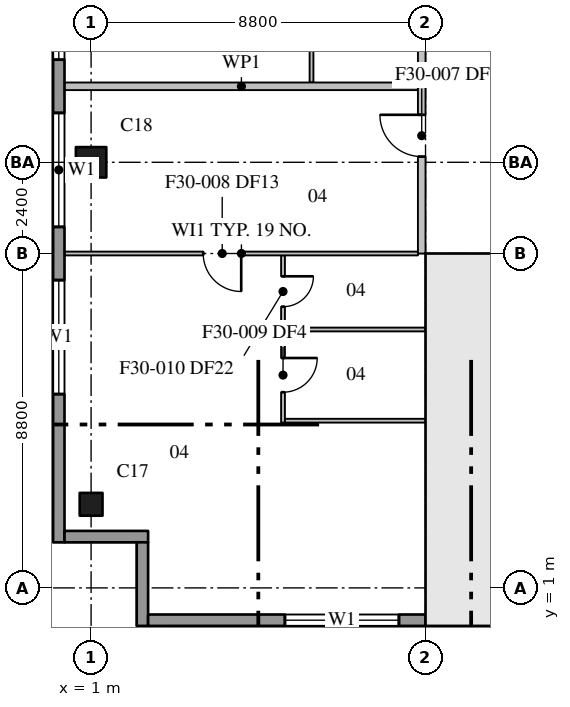
"""IFC4 building model, lengths in metres.
Left out: names, types, materials, properties, quantities, classifications, styles, units other than length and angle.
Written with IfcOpenShell. Run it as: python <this file> out.ifc"""

import sys

from ifc_helpers import new_model, si_unit, direction, frame, frame_2d, origin, origin_2d, place, context, subcontext, project, spatial, rectangle, extrude, element, fill, save


model = new_model("IFC4")
c1 = context("Model", 3, precision=1e-05, world=origin(), true_north=direction((0.0, 1.0)))
c2 = subcontext(c1, "Body", "Model", "MODEL_VIEW")
j1 = project(units=[si_unit("LENGTHUNIT", "METRE"), si_unit("PLANEANGLEUNIT", "RADIAN")], contexts=[c1])
p1 = place(None, origin())
s1 = spatial("IfcSite", under=j1, at=p1, CompositionType="ELEMENT")
p2 = place(p1, origin())
s2 = spatial("IfcBuilding", under=s1, at=p2, CompositionType="ELEMENT")
p3 = place(p2, frame((0.0, 0.0, 241.3)))
s3 = spatial("IfcBuildingStorey", under=s2, at=p3, CompositionType="ELEMENT", Elevation=241.3)
p4 = place(p3, frame((1.0, 3.2, 0.0), z_axis=(0.0, 0.0, 1.0), x_axis=(1.0, 0.0, 0.0)))
e1 = element("IfcColumn", 1, at=p4, inside=s3, PredefinedType="COLUMN", context=c2, shape_type="SweptSolid", body=[
    extrude(rectangle(XDim=0.6, YDim=0.6, at=origin_2d()), origin(), (0.0, 0.0, 1.0), 3.7),
])
p5 = place(p3, frame((1.0, 12.2, 0.0), z_axis=(0.0, 0.0, 1.0), x_axis=(1.0, 0.0, 0.0)))
e2 = element("IfcColumn", 2, at=p5, inside=s3, PredefinedType="COLUMN", context=c2, shape_type="SweptSolid", body=[
    extrude(rectangle(XDim=0.8, YDim=0.8, at=origin_2d()), origin(), (0.0, 0.0, 1.0), 3.7),
])
p6 = place(p3, frame((9.8, 0.95, 0.0), z_axis=(0.0, 0.0, 1.0), x_axis=(1.0, 0.0, 0.0)))
e3 = element("IfcWall", 3, at=p6, inside=s3, PredefinedType="SHEAR", context=c2, shape_type="SweptSolid", body=[
    extrude(rectangle(XDim=35.2, YDim=0.5, at=frame_2d((17.6, 0.0))), origin(), (0.0, 0.0, 1.0), 3.7),
])
p7 = place(p3, frame((10.75, 1.2, 0.0), z_axis=(0.0, 0.0, 1.0), x_axis=(0.0, 1.0, 0.0)))
e4 = element("IfcWall", 4, at=p7, inside=s3, PredefinedType="SHEAR", context=c2, shape_type="SweptSolid", body=[
    extrude(rectangle(XDim=8.6, YDim=0.5, at=frame_2d((4.3, 0.0))), origin(), (0.0, 0.0, 1.0), 3.7),
])
p8 = place(p3, frame((9.8, 9.6, 0.0), z_axis=(0.0, 0.0, 1.0), x_axis=(1.0, 0.0, 0.0)))
e5 = element("IfcWall", 5, at=p8, inside=s3, PredefinedType="SHEAR", context=c2, shape_type="SweptSolid", body=[
    extrude(rectangle(XDim=4.3, YDim=0.4, at=frame_2d((2.15, 0.0))), origin(), (0.0, 0.0, 1.0), 3.7),
])
p9 = place(p8, frame((2.05, 0.0, 0.0)))
e6 = element("IfcOpeningElement", 6, at=p9, cuts=e5, PredefinedType="OPENING", context=c2, shape_type="SweptSolid", body=[
    extrude(rectangle(XDim=1.2, YDim=2.1, at=frame_2d((0.6, 1.05))), frame((0.0, 0.21, 0.0), z_axis=(0.0, -1.0, 0.0), x_axis=(1.0, 0.0, 0.0)), (0.0, 0.0, 1.0), 0.42),
])
p10 = place(p3, frame((0.15, 31.65, 0.0), z_axis=(0.0, 0.0, 1.0), x_axis=(0.0, -1.0, 0.0)))
e7 = element("IfcWall", 7, at=p10, inside=s3, PredefinedType="STANDARD", context=c2, shape_type="SweptSolid", body=[
    extrude(rectangle(XDim=29.45, YDim=0.3, at=frame_2d((14.725, 0.0))), origin(), (0.0, 0.0, 1.0), 3.4),
])
p11 = place(p10, frame((4.95, 0.0, 0.75)))
e8 = element("IfcOpeningElement", 8, at=p11, cuts=e7, PredefinedType="OPENING", context=c2, shape_type="SweptSolid", body=[
    extrude(rectangle(XDim=3.0, YDim=2.3, at=frame_2d((1.5, 1.15))), frame((0.0, 0.16, 0.0), z_axis=(0.0, -1.0, 0.0), x_axis=(1.0, 0.0, 0.0)), (0.0, 0.0, 1.0), 0.32),
])
p12 = place(p10, frame((9.35, 0.0, 0.75)))
e9 = element("IfcOpeningElement", 9, at=p12, cuts=e7, PredefinedType="OPENING", context=c2, shape_type="SweptSolid", body=[
    extrude(rectangle(XDim=3.0, YDim=2.3, at=frame_2d((1.5, 1.15))), frame((0.0, 0.16, 0.0), z_axis=(0.0, -1.0, 0.0), x_axis=(1.0, 0.0, 0.0)), (0.0, 0.0, 1.0), 0.32),
])
p13 = place(p10, frame((13.75, 0.0, 0.75)))
e10 = element("IfcOpeningElement", 10, at=p13, cuts=e7, PredefinedType="OPENING", context=c2, shape_type="SweptSolid", body=[
    extrude(rectangle(XDim=3.0, YDim=2.3, at=frame_2d((1.5, 1.15))), frame((0.0, 0.16, 0.0), z_axis=(0.0, -1.0, 0.0), x_axis=(1.0, 0.0, 0.0)), (0.0, 0.0, 1.0), 0.32),
])
p14 = place(p10, frame((18.15, 0.0, 0.75)))
e11 = element("IfcOpeningElement", 11, at=p14, cuts=e7, PredefinedType="OPENING", context=c2, shape_type="SweptSolid", body=[
    extrude(rectangle(XDim=3.0, YDim=2.3, at=frame_2d((1.5, 1.15))), frame((0.0, 0.16, 0.0), z_axis=(0.0, -1.0, 0.0), x_axis=(1.0, 0.0, 0.0)), (0.0, 0.0, 1.0), 0.32),
])
p15 = place(p10, frame((22.55, 0.0, 0.75)))
e12 = element("IfcOpeningElement", 12, at=p15, cuts=e7, PredefinedType="OPENING", context=c2, shape_type="SweptSolid", body=[
    extrude(rectangle(XDim=3.0, YDim=2.3, at=frame_2d((1.5, 1.15))), frame((0.0, 0.16, 0.0), z_axis=(0.0, -1.0, 0.0), x_axis=(1.0, 0.0, 0.0)), (0.0, 0.0, 1.0), 0.32),
])
for number, where, z_axis, x_axis in (
    (13, (0.3, 2.35, 0.0), (0.0, 0.0, 1.0), (1.0, 0.0, 0.0)),
    (14, (2.35, 2.2, 0.0), (0.0, 0.0, 1.0), (0.0, -1.0, 0.0)),
):
    element("IfcWall", number, at=place(p3, frame(where, z_axis=z_axis, x_axis=x_axis)), inside=s3, PredefinedType="STANDARD", context=c2, shape_type="SweptSolid", body=[
        extrude(rectangle(XDim=2.2, YDim=0.3, at=frame_2d((1.1, 0.0))), origin(), (0.0, 0.0, 1.0), 3.4),
    ])
p16 = place(p3, frame((2.5, 0.15, 0.0), z_axis=(0.0, 0.0, 1.0), x_axis=(1.0, 0.0, 0.0)))
e15 = element("IfcWall", 15, at=p16, inside=s3, PredefinedType="STANDARD", context=c2, shape_type="SweptSolid", body=[
    extrude(rectangle(XDim=7.3, YDim=0.3, at=frame_2d((3.65, 0.0))), origin(), (0.0, 0.0, 1.0), 3.4),
])
p17 = place(p16, frame((3.6, 0.0, 0.75)))
e16 = element("IfcOpeningElement", 16, at=p17, cuts=e15, PredefinedType="OPENING", context=c2, shape_type="SweptSolid", body=[
    extrude(rectangle(XDim=3.0, YDim=2.3, at=frame_2d((1.5, 1.15))), frame((0.0, 0.16, 0.0), z_axis=(0.0, -1.0, 0.0), x_axis=(1.0, 0.0, 0.0)), (0.0, 0.0, 1.0), 0.32),
])
p18 = place(p3, frame((9.7, 9.8, 0.0), z_axis=(0.0, 0.0, 1.0), x_axis=(0.0, 1.0, 0.0)))
e17 = element("IfcWall", 17, at=p18, inside=s3, PredefinedType="PARTITIONING", context=c2, shape_type="SweptSolid", body=[
    extrude(rectangle(XDim=21.88, YDim=0.2, at=frame_2d((10.94, 0.0))), origin(), (0.0, 0.0, 1.0), 3.4),
])
p19 = place(p18, frame((2.55, 0.0, 0.0)))
e18 = element("IfcOpeningElement", 18, at=p19, cuts=e17, PredefinedType="OPENING", context=c2, shape_type="SweptSolid", body=[
    extrude(rectangle(XDim=1.1, YDim=2.1, at=frame_2d((0.55, 1.05))), frame((0.0, 0.11, 0.0), z_axis=(0.0, -1.0, 0.0), x_axis=(1.0, 0.0, 0.0)), (0.0, 0.0, 1.0), 0.22),
])
p20 = place(p18, frame((7.3, 0.0, 0.0)))
e19 = element("IfcOpeningElement", 19, at=p20, cuts=e17, PredefinedType="OPENING", context=c2, shape_type="SweptSolid", body=[
    extrude(rectangle(XDim=1.0, YDim=2.1, at=frame_2d((0.5, 1.05))), frame((0.0, 0.11, 0.0), z_axis=(0.0, -1.0, 0.0), x_axis=(1.0, 0.0, 0.0)), (0.0, 0.0, 1.0), 0.22),
])
p21 = place(p18, frame((12.45, 0.0, 0.0)))
e20 = element("IfcOpeningElement", 20, at=p21, cuts=e17, PredefinedType="OPENING", context=c2, shape_type="SweptSolid", body=[
    extrude(rectangle(XDim=1.1, YDim=2.1, at=frame_2d((0.55, 1.05))), frame((0.0, 0.11, 0.0), z_axis=(0.0, -1.0, 0.0), x_axis=(1.0, 0.0, 0.0)), (0.0, 0.0, 1.0), 0.22),
])
p22 = place(p3, frame((0.31, 14.2, 0.0), z_axis=(0.0, 0.0, 1.0), x_axis=(1.0, 0.0, 0.0)))
e21 = element("IfcWall", 21, at=p22, inside=s3, PredefinedType="PARTITIONING", context=c2, shape_type="SweptSolid", body=[
    extrude(rectangle(XDim=9.29, YDim=0.2, at=frame_2d((4.645, 0.0))), origin(), (0.0, 0.0, 1.0), 3.4),
])
p23 = place(p3, frame((6.05, 9.75, 0.0), z_axis=(0.0, 0.0, 1.0), x_axis=(0.0, -1.0, 0.0)))
e22 = element("IfcWall", 22, at=p23, inside=s3, PredefinedType="PARTITIONING", context=c2, shape_type="SweptSolid", body=[
    extrude(rectangle(XDim=4.4, YDim=0.1, at=frame_2d((2.2, 0.0))), origin(), (0.0, 0.0, 1.0), 3.4),
])
p24 = place(p23, frame((2.7, 0.0, 0.0)))
e23 = element("IfcOpeningElement", 23, at=p24, cuts=e22, PredefinedType="OPENING", context=c2, shape_type="SweptSolid", body=[
    extrude(rectangle(XDim=0.9, YDim=2.1, at=frame_2d((0.45, 1.05))), frame((0.0, 0.06, 0.0), z_axis=(0.0, -1.0, 0.0), x_axis=(1.0, 0.0, 0.0)), (0.0, 0.0, 1.0), 0.12),
])
p25 = place(p23, frame((0.55, 0.0, 0.0)))
e24 = element("IfcOpeningElement", 24, at=p25, cuts=e22, PredefinedType="OPENING", context=c2, shape_type="SweptSolid", body=[
    extrude(rectangle(XDim=0.8, YDim=2.1, at=frame_2d((0.4, 1.05))), frame((0.0, 0.06, 0.0), z_axis=(0.0, -1.0, 0.0), x_axis=(1.0, 0.0, 0.0)), (0.0, 0.0, 1.0), 0.12),
])
p26 = place(p3, frame((9.6, 9.8, 0.0), z_axis=(0.0, 0.0, 1.0), x_axis=(-1.0, 0.0, 0.0)))
e25 = element("IfcWall", 25, at=p26, inside=s3, PredefinedType="PARTITIONING", context=c2, shape_type="SweptSolid", body=[
    extrude(rectangle(XDim=9.29, YDim=0.1, at=frame_2d((4.645, 0.0))), origin(), (0.0, 0.0, 1.0), 3.4),
])
p27 = place(p26, frame((4.65, 0.0, 0.0)))
e26 = element("IfcOpeningElement", 26, at=p27, cuts=e25, PredefinedType="OPENING", context=c2, shape_type="SweptSolid", body=[
    extrude(rectangle(XDim=1.0, YDim=2.1, at=frame_2d((0.5, 1.05))), frame((0.0, 0.06, 0.0), z_axis=(0.0, -1.0, 0.0), x_axis=(1.0, 0.0, 0.0)), (0.0, 0.0, 1.0), 0.12),
])
for number, where, z_axis, x_axis in (
    (27, (6.1, 5.4, 0.0), (0.0, 0.0, 1.0), (1.0, 0.0, 0.0)),
    (28, (6.1, 7.8, 0.0), (0.0, 0.0, 1.0), (1.0, 0.0, 0.0)),
):
    element("IfcWall", number, at=place(p3, frame(where, z_axis=z_axis, x_axis=x_axis)), inside=s3, PredefinedType="PARTITIONING", context=c2, shape_type="SweptSolid", body=[
        extrude(rectangle(XDim=3.7, YDim=0.1, at=frame_2d((1.85, 0.0))), origin(), (0.0, 0.0, 1.0), 3.4),
    ])
p28 = place(p3, frame((6.8, 14.3, 0.0), z_axis=(0.0, 0.0, 1.0), x_axis=(0.0, 1.0, 0.0)))
e29 = element("IfcWall", 29, at=p28, inside=s3, PredefinedType="PARTITIONING", context=c2, shape_type="SweptSolid", body=[
    extrude(rectangle(XDim=2.65, YDim=0.1, at=frame_2d((1.325, 0.0))), origin(), (0.0, 0.0, 1.0), 3.4),
])
p29 = place(p13, origin())
e30 = element("IfcWindow", 30, at=p29, inside=s3, PartitioningType="SINGLE_PANEL", PredefinedType="WINDOW", context=c2, shape_type="SweptSolid", body=[
    extrude(rectangle(XDim=3.0, YDim=2.3, at=frame_2d((1.5, 1.15))), frame((0.0, 0.03, 0.0), z_axis=(0.0, -1.0, 0.0), x_axis=(1.0, 0.0, 0.0)), (0.0, 0.0, 1.0), 0.06),
])
fill(e10, e30)
p30 = place(p14, origin())
e31 = element("IfcWindow", 31, at=p30, inside=s3, PartitioningType="SINGLE_PANEL", PredefinedType="WINDOW", context=c2, shape_type="SweptSolid", body=[
    extrude(rectangle(XDim=3.0, YDim=2.3, at=frame_2d((1.5, 1.15))), frame((0.0, 0.03, 0.0), z_axis=(0.0, -1.0, 0.0), x_axis=(1.0, 0.0, 0.0)), (0.0, 0.0, 1.0), 0.06),
])
fill(e11, e31)
p31 = place(p15, origin())
e32 = element("IfcWindow", 32, at=p31, inside=s3, PartitioningType="SINGLE_PANEL", PredefinedType="WINDOW", context=c2, shape_type="SweptSolid", body=[
    extrude(rectangle(XDim=3.0, YDim=2.3, at=frame_2d((1.5, 1.15))), frame((0.0, 0.03, 0.0), z_axis=(0.0, -1.0, 0.0), x_axis=(1.0, 0.0, 0.0)), (0.0, 0.0, 1.0), 0.06),
])
fill(e12, e32)
p32 = place(p17, origin())
e33 = element("IfcWindow", 33, at=p32, inside=s3, PartitioningType="SINGLE_PANEL", PredefinedType="WINDOW", context=c2, shape_type="SweptSolid", body=[
    extrude(rectangle(XDim=3.0, YDim=2.3, at=frame_2d((1.5, 1.15))), frame((0.0, 0.03, 0.0), z_axis=(0.0, -1.0, 0.0), x_axis=(1.0, 0.0, 0.0)), (0.0, 0.0, 1.0), 0.06),
])
fill(e16, e33)
p33 = place(p19, origin())
e34 = element("IfcDoor", 34, at=p33, inside=s3, OperationType="SINGLE_SWING_RIGHT", PredefinedType="DOOR", context=c2, shape_type="SweptSolid", body=[
    extrude(rectangle(XDim=1.1, YDim=2.1, at=frame_2d((0.55, 1.05))), frame((0.0, 0.025, 0.0), z_axis=(0.0, -1.0, 0.0), x_axis=(1.0, 0.0, 0.0)), (0.0, 0.0, 1.0), 0.05),
])
fill(e18, e34)
p34 = place(p27, origin())
e35 = element("IfcDoor", 35, at=p34, inside=s3, OperationType="SINGLE_SWING_LEFT", PredefinedType="DOOR", context=c2, shape_type="SweptSolid", body=[
    extrude(rectangle(XDim=1.0, YDim=2.1, at=frame_2d((0.5, 1.05))), frame((0.0, 0.025, 0.0), z_axis=(0.0, -1.0, 0.0), x_axis=(1.0, 0.0, 0.0)), (0.0, 0.0, 1.0), 0.05),
])
fill(e26, e35)
p35 = place(p24, origin())
e36 = element("IfcDoor", 36, at=p35, inside=s3, OperationType="SINGLE_SWING_LEFT", PredefinedType="DOOR", context=c2, shape_type="SweptSolid", body=[
    extrude(rectangle(XDim=0.9, YDim=2.1, at=frame_2d((0.45, 1.05))), frame((0.0, 0.025, 0.0), z_axis=(0.0, -1.0, 0.0), x_axis=(1.0, 0.0, 0.0)), (0.0, 0.0, 1.0), 0.05),
])
fill(e23, e36)
p36 = place(p25, origin())
e37 = element("IfcDoor", 37, at=p36, inside=s3, OperationType="SINGLE_SWING_LEFT", PredefinedType="DOOR", context=c2, shape_type="SweptSolid", body=[
    extrude(rectangle(XDim=0.8, YDim=2.1, at=frame_2d((0.4, 1.05))), frame((0.0, 0.025, 0.0), z_axis=(0.0, -1.0, 0.0), x_axis=(1.0, 0.0, 0.0)), (0.0, 0.0, 1.0), 0.05),
])
fill(e24, e37)
save(model, sys.argv[1])
